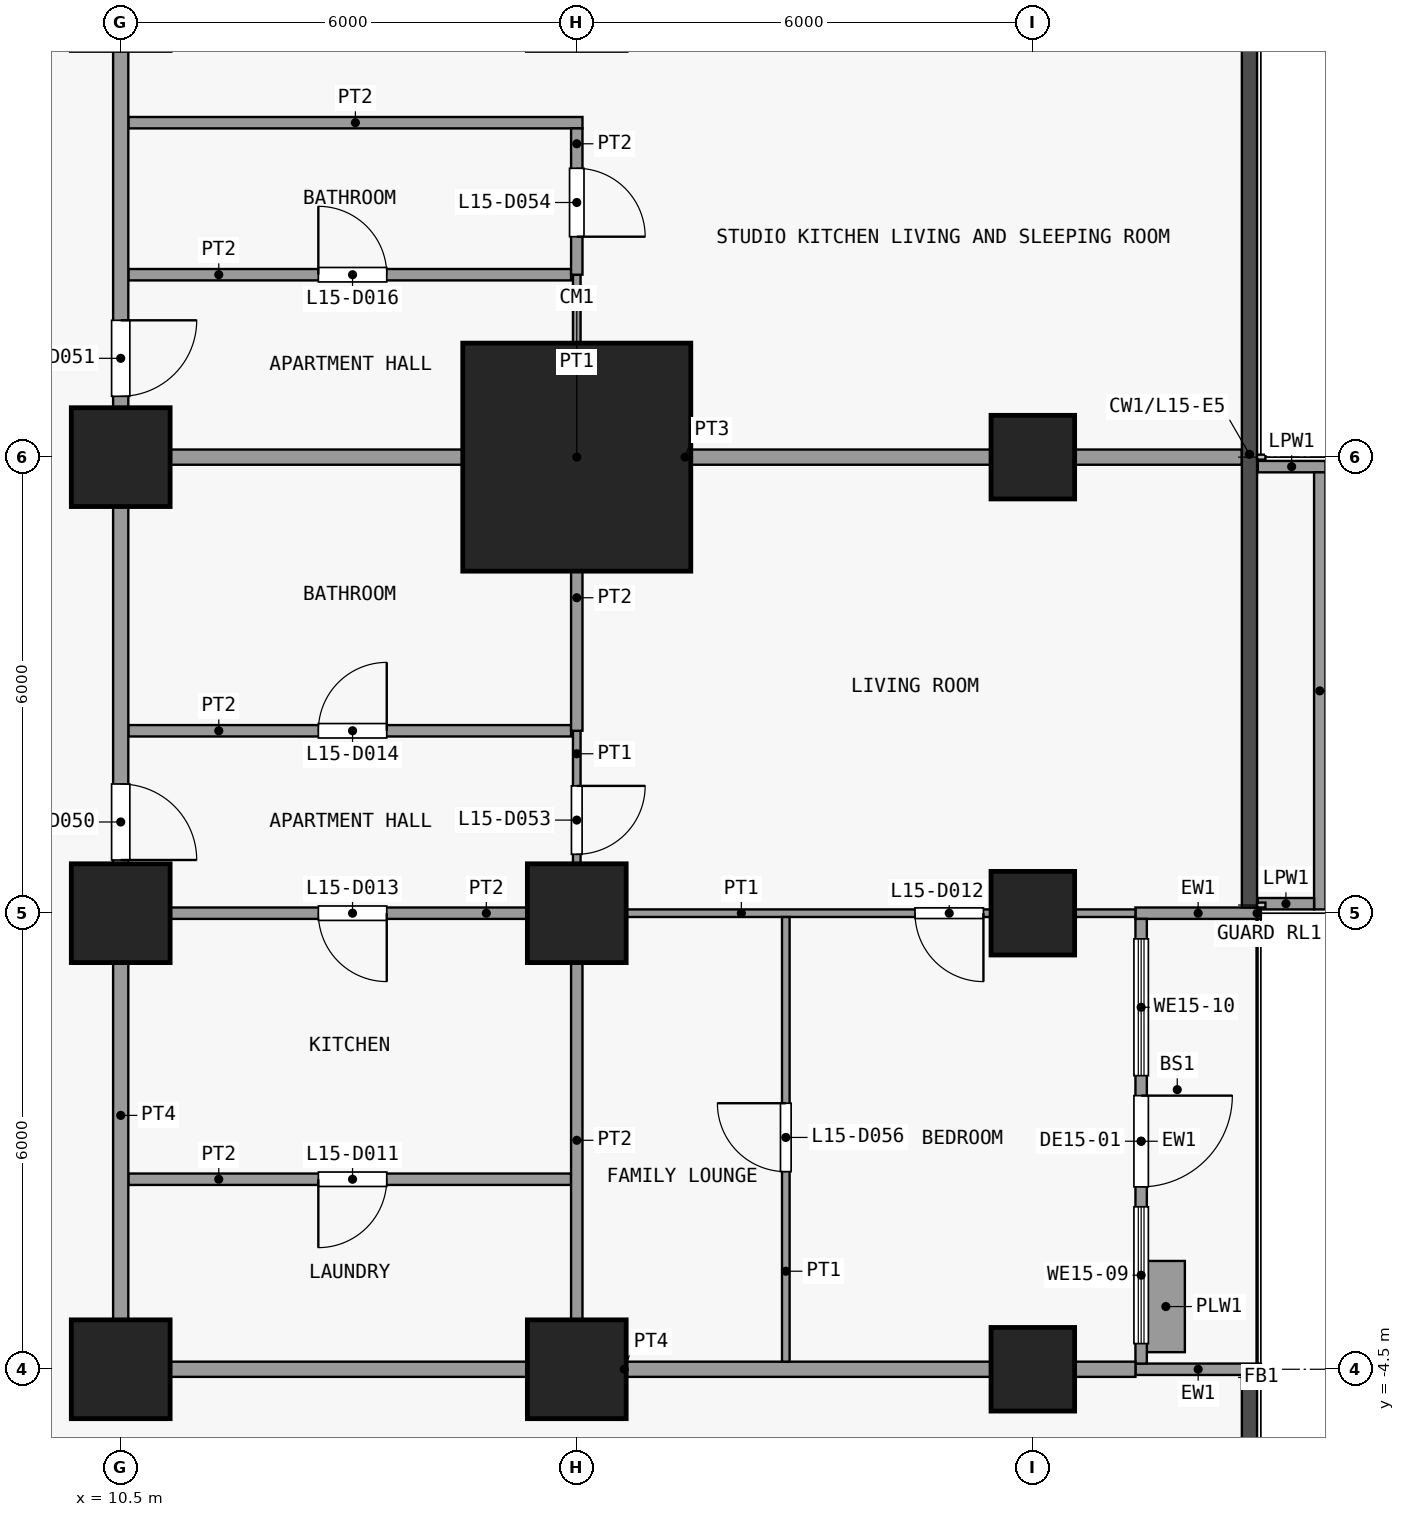
"""IFC4 building model, lengths in metres.
Left out: names, types, materials, properties, quantities, classifications, styles, units other than length and angle.
Written with IfcOpenShell. Run it as: python <this file> out.ifc"""

import sys

from ifc_helpers import new_model, si_unit, direction, frame, frame_2d, origin, origin_2d, place, context, subcontext, project, spatial, rectangle, extrude, element, fill, save


model = new_model("IFC4")
c1 = context("Model", 3, precision=1e-05, world=origin(), true_north=direction((0.0, 1.0)))
c2 = subcontext(c1, "Body", "Model", "MODEL_VIEW")
j1 = project(units=[si_unit("LENGTHUNIT", "METRE"), si_unit("PLANEANGLEUNIT", "RADIAN")], contexts=[c1])
p1 = place(None, origin())
s1 = spatial("IfcSite", under=j1, at=p1, CompositionType="ELEMENT")
p2 = place(p1, origin())
s2 = spatial("IfcBuilding", under=s1, at=p2, CompositionType="ELEMENT")
p3 = place(p2, frame((0.0, 0.0, 64.9)))
s3 = spatial("IfcBuildingStorey", under=s2, at=p3, CompositionType="ELEMENT", Elevation=64.9)
for number, where, z_axis, x_axis in (
    (1, (10.5, -4.5, 0.0), (0.0, 0.0, 1.0), (1.0, 0.0, 0.0)),
    (2, (10.5, 1.5, 0.0), (0.0, 0.0, 1.0), (1.0, 0.0, 0.0)),
    (3, (10.5, 7.5, 0.0), (0.0, 0.0, 1.0), (1.0, 0.0, 0.0)),
    (4, (16.5, -4.5, 0.0), (0.0, 0.0, 1.0), (1.0, 0.0, 0.0)),
    (5, (16.5, 1.5, 0.0), (0.0, 0.0, 1.0), (1.0, 0.0, 0.0)),
):
    element("IfcColumn", number, at=place(p3, frame(where, z_axis=z_axis, x_axis=x_axis)), inside=s3, PredefinedType="COLUMN", context=c2, shape_type="SweptSolid", body=[
        extrude(rectangle(XDim=1.3, YDim=1.3, at=origin_2d()), origin(), (0.0, 0.0, 1.0), 3.6),
    ])
p4 = place(p3, frame((16.5, 7.5, 0.0), z_axis=(0.0, 0.0, 1.0), x_axis=(1.0, 0.0, 0.0)))
e6 = element("IfcColumn", 6, at=p4, inside=s3, PredefinedType="COLUMN", context=c2, shape_type="SweptSolid", body=[
    extrude(rectangle(XDim=3.0, YDim=3.0, at=origin_2d()), origin(), (0.0, 0.0, 1.0), 3.6),
])
for number, where, z_axis, x_axis in (
    (7, (22.5, -4.5, 0.0), (0.0, 0.0, 1.0), (1.0, 0.0, 0.0)),
    (8, (22.5, 1.5, 0.0), (0.0, 0.0, 1.0), (1.0, 0.0, 0.0)),
    (9, (22.5, 7.5, 0.0), (0.0, 0.0, 1.0), (1.0, 0.0, 0.0)),
):
    element("IfcColumn", number, at=place(p3, frame(where, z_axis=z_axis, x_axis=x_axis)), inside=s3, PredefinedType="COLUMN", context=c2, shape_type="SweptSolid", body=[
        extrude(rectangle(XDim=1.1, YDim=1.1, at=origin_2d()), origin(), (0.0, 0.0, 1.0), 3.6),
    ])
for number, where, z_axis, x_axis in (
    (10, (23.85, -4.5, 0.0), (0.0, 0.0, 1.0), (1.0, 0.0, 0.0)),
    (11, (23.85, 1.5, 0.0), (0.0, 0.0, 1.0), (1.0, 0.0, 0.0)),
):
    element("IfcWall", number, at=place(p3, frame(where, z_axis=z_axis, x_axis=x_axis)), inside=s3, PredefinedType="SOLIDWALL", context=c2, shape_type="SweptSolid", body=[
        extrude(rectangle(XDim=1.65, YDim=0.15, at=frame_2d((0.825, 0.0))), origin(), (0.0, 0.0, 1.0), 3.3),
    ])
p5 = place(p3, frame((23.925, 1.425, 0.0), z_axis=(0.0, 0.0, 1.0), x_axis=(0.0, -1.0, 0.0)))
e12 = element("IfcWall", 12, at=p5, inside=s3, PredefinedType="SOLIDWALL", context=c2, shape_type="SweptSolid", body=[
    extrude(rectangle(XDim=5.85, YDim=0.15, at=frame_2d((2.925, 0.0))), origin(), (0.0, 0.0, 1.0), 3.3),
])
p6 = place(p5, frame((2.325, 0.0, 0.0)))
e13 = element("IfcOpeningElement", 13, at=p6, cuts=e12, PredefinedType="OPENING", context=c2, shape_type="SweptSolid", body=[
    extrude(rectangle(XDim=1.2, YDim=2.4, at=frame_2d((0.6, 1.2))), frame((0.0, 0.085, 0.0), z_axis=(0.0, -1.0, 0.0), x_axis=(1.0, 0.0, 0.0)), (0.0, 0.0, 1.0), 0.17),
])
p7 = place(p5, frame((3.788, 0.0, 0.9)))
e14 = element("IfcOpeningElement", 14, at=p7, cuts=e12, PredefinedType="OPENING", context=c2, shape_type="SweptSolid", body=[
    extrude(rectangle(XDim=1.8, YDim=2.1, at=frame_2d((0.9, 1.05))), frame((0.0, 0.085, 0.0), z_axis=(0.0, -1.0, 0.0), x_axis=(1.0, 0.0, 0.0)), (0.0, 0.0, 1.0), 0.17),
])
p8 = place(p5, frame((0.262, 0.0, 0.9)))
e15 = element("IfcOpeningElement", 15, at=p8, cuts=e12, PredefinedType="OPENING", context=c2, shape_type="SweptSolid", body=[
    extrude(rectangle(XDim=1.8, YDim=2.1, at=frame_2d((0.9, 1.05))), frame((0.0, 0.085, 0.0), z_axis=(0.0, -1.0, 0.0), x_axis=(1.0, 0.0, 0.0)), (0.0, 0.0, 1.0), 0.17),
])
p9 = place(p3, frame((24.25, -4.275, 0.0), z_axis=(0.0, 0.0, 1.0), x_axis=(0.0, 1.0, 0.0)))
e16 = element("IfcWall", 16, at=p9, inside=s3, PredefinedType="USERDEFINED", context=c2, shape_type="SweptSolid", body=[
    extrude(rectangle(XDim=1.2, YDim=0.5, at=frame_2d((0.6, 0.0))), origin(), (0.0, 0.0, 1.0), 0.9),
])
p10 = place(p3, frame((25.46, 7.375, 0.0), z_axis=(0.0, 0.0, 1.0), x_axis=(1.0, 0.0, 0.0)))
e17 = element("IfcWall", 17, at=p10, inside=s3, PredefinedType="PARAPET", context=c2, shape_type="SweptSolid", body=[
    extrude(rectangle(XDim=0.89, YDim=0.15, at=frame_2d((0.445, 0.0))), origin(), (0.0, 0.0, 1.0), 1.15),
])
p11 = place(p3, frame((26.275, 7.3, 0.0), z_axis=(0.0, 0.0, 1.0), x_axis=(0.0, -1.0, 0.0)))
e18 = element("IfcWall", 18, at=p11, inside=s3, PredefinedType="PARAPET", context=c2, shape_type="SweptSolid", body=[
    extrude(rectangle(XDim=5.75, YDim=0.15, at=frame_2d((2.875, 0.0))), origin(), (0.0, 0.0, 1.0), 1.15),
])
p12 = place(p3, frame((26.2, 1.625, 0.0), z_axis=(0.0, 0.0, 1.0), x_axis=(-1.0, 0.0, 0.0)))
e19 = element("IfcWall", 19, at=p12, inside=s3, PredefinedType="PARAPET", context=c2, shape_type="SweptSolid", body=[
    extrude(rectangle(XDim=0.74, YDim=0.15, at=frame_2d((0.37, 0.0))), origin(), (0.0, 0.0, 1.0), 1.15),
])
p13 = place(p3, frame((10.4, -4.5, 0.0), z_axis=(0.0, 0.0, 1.0), x_axis=(1.0, 0.0, 0.0)))
e20 = element("IfcWall", 20, at=p13, inside=s3, PredefinedType="PARTITIONING", context=c2, shape_type="SweptSolid", body=[
    extrude(rectangle(XDim=13.45, YDim=0.2, at=frame_2d((6.725, 0.0))), origin(), (0.0, 0.0, 1.0), 3.3),
])
p14 = place(p3, frame((10.6, -2.0, 0.0), z_axis=(0.0, 0.0, 1.0), x_axis=(1.0, 0.0, 0.0)))
e21 = element("IfcWall", 21, at=p14, inside=s3, PredefinedType="PARTITIONING", context=c2, shape_type="SweptSolid", body=[
    extrude(rectangle(XDim=5.825, YDim=0.15, at=frame_2d((2.913, 0.0))), origin(), (0.0, 0.0, 1.0), 3.3),
])
p15 = place(p14, frame((2.5, 0.0, 0.0)))
e22 = element("IfcOpeningElement", 22, at=p15, cuts=e21, PredefinedType="OPENING", context=c2, shape_type="SweptSolid", body=[
    extrude(rectangle(XDim=0.9, YDim=2.1, at=frame_2d((0.45, 1.05))), frame((0.0, 0.085, 0.0), z_axis=(0.0, -1.0, 0.0), x_axis=(1.0, 0.0, 0.0)), (0.0, 0.0, 1.0), 0.17),
])
p16 = place(p3, frame((16.5, 1.5, 0.0), z_axis=(0.0, 0.0, 1.0), x_axis=(1.0, 0.0, 0.0)))
e23 = element("IfcWall", 23, at=p16, inside=s3, PredefinedType="PARTITIONING", context=c2, shape_type="SweptSolid", body=[
    extrude(rectangle(XDim=7.35, YDim=0.1, at=frame_2d((3.675, 0.0))), origin(), (0.0, 0.0, 1.0), 3.3),
])
p17 = place(p16, frame((4.45, 0.0, 0.0)))
e24 = element("IfcOpeningElement", 24, at=p17, cuts=e23, PredefinedType="OPENING", context=c2, shape_type="SweptSolid", body=[
    extrude(rectangle(XDim=0.9, YDim=2.1, at=frame_2d((0.45, 1.05))), frame((0.0, 0.06, 0.0), z_axis=(0.0, -1.0, 0.0), x_axis=(1.0, 0.0, 0.0)), (0.0, 0.0, 1.0), 0.12),
])
p18 = place(p3, frame((10.6, 1.5, 0.0), z_axis=(0.0, 0.0, 1.0), x_axis=(1.0, 0.0, 0.0)))
e25 = element("IfcWall", 25, at=p18, inside=s3, PredefinedType="PARTITIONING", context=c2, shape_type="SweptSolid", body=[
    extrude(rectangle(XDim=5.9, YDim=0.15, at=frame_2d((2.95, 0.0))), origin(), (0.0, 0.0, 1.0), 3.3),
])
p19 = place(p18, frame((2.5, 0.0, 0.0)))
e26 = element("IfcOpeningElement", 26, at=p19, cuts=e25, PredefinedType="OPENING", context=c2, shape_type="SweptSolid", body=[
    extrude(rectangle(XDim=0.9, YDim=2.1, at=frame_2d((0.45, 1.05))), frame((0.0, 0.085, 0.0), z_axis=(0.0, -1.0, 0.0), x_axis=(1.0, 0.0, 0.0)), (0.0, 0.0, 1.0), 0.17),
])
p20 = place(p3, frame((10.6, 3.9, 0.0), z_axis=(0.0, 0.0, 1.0), x_axis=(1.0, 0.0, 0.0)))
e27 = element("IfcWall", 27, at=p20, inside=s3, PredefinedType="PARTITIONING", context=c2, shape_type="SweptSolid", body=[
    extrude(rectangle(XDim=5.825, YDim=0.15, at=frame_2d((2.913, 0.0))), origin(), (0.0, 0.0, 1.0), 3.3),
])
p21 = place(p20, frame((2.5, 0.0, 0.0)))
e28 = element("IfcOpeningElement", 28, at=p21, cuts=e27, PredefinedType="OPENING", context=c2, shape_type="SweptSolid", body=[
    extrude(rectangle(XDim=0.9, YDim=2.1, at=frame_2d((0.45, 1.05))), frame((0.0, 0.085, 0.0), z_axis=(0.0, -1.0, 0.0), x_axis=(1.0, 0.0, 0.0)), (0.0, 0.0, 1.0), 0.17),
])
p22 = place(p3, frame((10.6, 7.5, 0.0), z_axis=(0.0, 0.0, 1.0), x_axis=(1.0, 0.0, 0.0)))
e29 = element("IfcWall", 29, at=p22, inside=s3, PredefinedType="PARTITIONING", context=c2, shape_type="SweptSolid", body=[
    extrude(rectangle(XDim=14.65, YDim=0.2, at=frame_2d((7.325, 0.0))), origin(), (0.0, 0.0, 1.0), 3.3),
])
p23 = place(p3, frame((10.6, 9.9, 0.0), z_axis=(0.0, 0.0, 1.0), x_axis=(1.0, 0.0, 0.0)))
e30 = element("IfcWall", 30, at=p23, inside=s3, PredefinedType="PARTITIONING", context=c2, shape_type="SweptSolid", body=[
    extrude(rectangle(XDim=5.825, YDim=0.15, at=frame_2d((2.913, 0.0))), origin(), (0.0, 0.0, 1.0), 3.3),
])
p24 = place(p23, frame((2.5, 0.0, 0.0)))
e31 = element("IfcOpeningElement", 31, at=p24, cuts=e30, PredefinedType="OPENING", context=c2, shape_type="SweptSolid", body=[
    extrude(rectangle(XDim=0.9, YDim=2.1, at=frame_2d((0.45, 1.05))), frame((0.0, 0.085, 0.0), z_axis=(0.0, -1.0, 0.0), x_axis=(1.0, 0.0, 0.0)), (0.0, 0.0, 1.0), 0.17),
])
p25 = place(p3, frame((10.6, 11.9, 0.0), z_axis=(0.0, 0.0, 1.0), x_axis=(1.0, 0.0, 0.0)))
e32 = element("IfcWall", 32, at=p25, inside=s3, PredefinedType="PARTITIONING", context=c2, shape_type="SweptSolid", body=[
    extrude(rectangle(XDim=5.975, YDim=0.15, at=frame_2d((2.987, 0.0))), origin(), (0.0, 0.0, 1.0), 3.3),
])
p26 = place(p3, frame((10.5, -4.4, 0.0), z_axis=(0.0, 0.0, 1.0), x_axis=(0.0, 1.0, 0.0)))
e33 = element("IfcWall", 33, at=p26, inside=s3, PredefinedType="PARTITIONING", context=c2, shape_type="SweptSolid", body=[
    extrude(rectangle(XDim=17.8, YDim=0.2, at=frame_2d((8.9, 0.0))), origin(), (0.0, 0.0, 1.0), 3.3),
])
p27 = place(p26, frame((6.6, 0.0, 0.0)))
e34 = element("IfcOpeningElement", 34, at=p27, cuts=e33, PredefinedType="OPENING", context=c2, shape_type="SweptSolid", body=[
    extrude(rectangle(XDim=1.0, YDim=2.1, at=frame_2d((0.5, 1.05))), frame((0.0, 0.11, 0.0), z_axis=(0.0, -1.0, 0.0), x_axis=(1.0, 0.0, 0.0)), (0.0, 0.0, 1.0), 0.22),
])
p28 = place(p26, frame((12.7, 0.0, 0.0)))
e35 = element("IfcOpeningElement", 35, at=p28, cuts=e33, PredefinedType="OPENING", context=c2, shape_type="SweptSolid", body=[
    extrude(rectangle(XDim=1.0, YDim=2.1, at=frame_2d((0.5, 1.05))), frame((0.0, 0.11, 0.0), z_axis=(0.0, -1.0, 0.0), x_axis=(1.0, 0.0, 0.0)), (0.0, 0.0, 1.0), 0.22),
])
p29 = place(p3, frame((16.5, 1.575, 0.0), z_axis=(0.0, 0.0, 1.0), x_axis=(0.0, 1.0, 0.0)))
e36 = element("IfcWall", 36, at=p29, inside=s3, PredefinedType="PARTITIONING", context=c2, shape_type="SweptSolid", body=[
    extrude(rectangle(XDim=2.325, YDim=0.1, at=frame_2d((1.163, 0.0))), origin(), (0.0, 0.0, 1.0), 3.3),
])
p30 = place(p29, frame((0.7, 0.0, 0.0)))
e37 = element("IfcOpeningElement", 37, at=p30, cuts=e36, PredefinedType="OPENING", context=c2, shape_type="SweptSolid", body=[
    extrude(rectangle(XDim=0.9, YDim=2.1, at=frame_2d((0.45, 1.05))), frame((0.0, 0.06, 0.0), z_axis=(0.0, -1.0, 0.0), x_axis=(1.0, 0.0, 0.0)), (0.0, 0.0, 1.0), 0.12),
])
p31 = place(p3, frame((16.5, 7.6, 0.0), z_axis=(0.0, 0.0, 1.0), x_axis=(0.0, 1.0, 0.0)))
e38 = element("IfcWall", 38, at=p31, inside=s3, PredefinedType="PARTITIONING", context=c2, shape_type="SweptSolid", body=[
    extrude(rectangle(XDim=2.3, YDim=0.1, at=frame_2d((1.15, 0.0))), origin(), (0.0, 0.0, 1.0), 3.3),
])
p32 = place(p3, frame((16.5, -4.4, 0.0), z_axis=(0.0, 0.0, 1.0), x_axis=(0.0, 1.0, 0.0)))
e39 = element("IfcWall", 39, at=p32, inside=s3, PredefinedType="PARTITIONING", context=c2, shape_type="SweptSolid", body=[
    extrude(rectangle(XDim=5.825, YDim=0.15, at=frame_2d((2.913, 0.0))), origin(), (0.0, 0.0, 1.0), 3.3),
])
p33 = place(p3, frame((16.5, 3.9, 0.0), z_axis=(0.0, 0.0, 1.0), x_axis=(0.0, 1.0, 0.0)))
e40 = element("IfcWall", 40, at=p33, inside=s3, PredefinedType="PARTITIONING", context=c2, shape_type="SweptSolid", body=[
    extrude(rectangle(XDim=3.5, YDim=0.15, at=frame_2d((1.75, 0.0))), origin(), (0.0, 0.0, 1.0), 3.3),
])
p34 = place(p3, frame((16.5, 9.9, 0.0), z_axis=(0.0, 0.0, 1.0), x_axis=(0.0, 1.0, 0.0)))
e41 = element("IfcWall", 41, at=p34, inside=s3, PredefinedType="PARTITIONING", context=c2, shape_type="SweptSolid", body=[
    extrude(rectangle(XDim=1.925, YDim=0.15, at=frame_2d((0.962, 0.0))), origin(), (0.0, 0.0, 1.0), 3.3),
])
p35 = place(p34, frame((0.5, 0.0, 0.0)))
e42 = element("IfcOpeningElement", 42, at=p35, cuts=e41, PredefinedType="OPENING", context=c2, shape_type="SweptSolid", body=[
    extrude(rectangle(XDim=0.9, YDim=2.1, at=frame_2d((0.45, 1.05))), frame((0.0, 0.085, 0.0), z_axis=(0.0, -1.0, 0.0), x_axis=(1.0, 0.0, 0.0)), (0.0, 0.0, 1.0), 0.17),
])
p36 = place(p3, frame((19.25, -4.4, 0.0), z_axis=(0.0, 0.0, 1.0), x_axis=(0.0, 1.0, 0.0)))
e43 = element("IfcWall", 43, at=p36, inside=s3, PredefinedType="PARTITIONING", context=c2, shape_type="SweptSolid", body=[
    extrude(rectangle(XDim=5.85, YDim=0.1, at=frame_2d((2.925, 0.0))), origin(), (0.0, 0.0, 1.0), 3.3),
])
p37 = place(p36, frame((2.5, 0.0, 0.0)))
e44 = element("IfcOpeningElement", 44, at=p37, cuts=e43, PredefinedType="OPENING", context=c2, shape_type="SweptSolid", body=[
    extrude(rectangle(XDim=0.9, YDim=2.1, at=frame_2d((0.45, 1.05))), frame((0.0, 0.06, 0.0), z_axis=(0.0, -1.0, 0.0), x_axis=(1.0, 0.0, 0.0)), (0.0, 0.0, 1.0), 0.12),
])
p38 = place(p6, origin())
e45 = element("IfcDoor", 45, at=p38, inside=s3, OperationType="SINGLE_SWING_LEFT", PredefinedType="DOOR", context=c2, shape_type="SweptSolid", body=[
    extrude(rectangle(XDim=1.2, YDim=2.4, at=frame_2d((0.6, 1.2))), frame((0.0, 0.025, 0.0), z_axis=(0.0, -1.0, 0.0), x_axis=(1.0, 0.0, 0.0)), (0.0, 0.0, 1.0), 0.05),
])
fill(e13, e45)
p39 = place(p7, origin())
e46 = element("IfcWindow", 46, at=p39, inside=s3, PartitioningType="SINGLE_PANEL", PredefinedType="WINDOW", context=c2, shape_type="SweptSolid", body=[
    extrude(rectangle(XDim=1.8, YDim=2.1, at=frame_2d((0.9, 1.05))), frame((0.0, 0.03, 0.0), z_axis=(0.0, -1.0, 0.0), x_axis=(1.0, 0.0, 0.0)), (0.0, 0.0, 1.0), 0.06),
])
fill(e14, e46)
p40 = place(p8, origin())
e47 = element("IfcWindow", 47, at=p40, inside=s3, PartitioningType="SINGLE_PANEL", PredefinedType="WINDOW", context=c2, shape_type="SweptSolid", body=[
    extrude(rectangle(XDim=1.8, YDim=2.1, at=frame_2d((0.9, 1.05))), frame((0.0, 0.03, 0.0), z_axis=(0.0, -1.0, 0.0), x_axis=(1.0, 0.0, 0.0)), (0.0, 0.0, 1.0), 0.06),
])
fill(e15, e47)
p41 = place(p15, origin())
e48 = element("IfcDoor", 48, at=p41, inside=s3, OperationType="SINGLE_SWING_LEFT", PredefinedType="DOOR", context=c2, shape_type="SweptSolid", body=[
    extrude(rectangle(XDim=0.9, YDim=2.1, at=frame_2d((0.45, 1.05))), frame((0.0, 0.025, 0.0), z_axis=(0.0, -1.0, 0.0), x_axis=(1.0, 0.0, 0.0)), (0.0, 0.0, 1.0), 0.05),
])
fill(e22, e48)
p42 = place(p17, origin())
e49 = element("IfcDoor", 49, at=p42, inside=s3, OperationType="SINGLE_SWING_RIGHT", PredefinedType="DOOR", context=c2, shape_type="SweptSolid", body=[
    extrude(rectangle(XDim=0.9, YDim=2.1, at=frame_2d((0.45, 1.05))), frame((0.0, 0.025, 0.0), z_axis=(0.0, -1.0, 0.0), x_axis=(1.0, 0.0, 0.0)), (0.0, 0.0, 1.0), 0.05),
])
fill(e24, e49)
p43 = place(p19, origin())
e50 = element("IfcDoor", 50, at=p43, inside=s3, OperationType="SINGLE_SWING_RIGHT", PredefinedType="DOOR", context=c2, shape_type="SweptSolid", body=[
    extrude(rectangle(XDim=0.9, YDim=2.1, at=frame_2d((0.45, 1.05))), frame((0.0, 0.025, 0.0), z_axis=(0.0, -1.0, 0.0), x_axis=(1.0, 0.0, 0.0)), (0.0, 0.0, 1.0), 0.05),
])
fill(e26, e50)
p44 = place(p21, origin())
e51 = element("IfcDoor", 51, at=p44, inside=s3, OperationType="SINGLE_SWING_LEFT", PredefinedType="DOOR", context=c2, shape_type="SweptSolid", body=[
    extrude(rectangle(XDim=0.9, YDim=2.1, at=frame_2d((0.45, 1.05))), frame((0.0, 0.025, 0.0), z_axis=(0.0, -1.0, 0.0), x_axis=(1.0, 0.0, 0.0)), (0.0, 0.0, 1.0), 0.05),
])
fill(e28, e51)
p45 = place(p24, origin())
e52 = element("IfcDoor", 52, at=p45, inside=s3, OperationType="SINGLE_SWING_RIGHT", PredefinedType="DOOR", context=c2, shape_type="SweptSolid", body=[
    extrude(rectangle(XDim=0.9, YDim=2.1, at=frame_2d((0.45, 1.05))), frame((0.0, 0.025, 0.0), z_axis=(0.0, -1.0, 0.0), x_axis=(1.0, 0.0, 0.0)), (0.0, 0.0, 1.0), 0.05),
])
fill(e31, e52)
p46 = place(p27, origin())
e53 = element("IfcDoor", 53, at=p46, inside=s3, OperationType="SINGLE_SWING_LEFT", PredefinedType="DOOR", context=c2, shape_type="SweptSolid", body=[
    extrude(rectangle(XDim=1.0, YDim=2.1, at=frame_2d((0.5, 1.05))), frame((0.0, 0.025, 0.0), z_axis=(0.0, -1.0, 0.0), x_axis=(1.0, 0.0, 0.0)), (0.0, 0.0, 1.0), 0.05),
])
fill(e34, e53)
p47 = place(p28, origin())
e54 = element("IfcDoor", 54, at=p47, inside=s3, OperationType="SINGLE_SWING_RIGHT", PredefinedType="DOOR", context=c2, shape_type="SweptSolid", body=[
    extrude(rectangle(XDim=1.0, YDim=2.1, at=frame_2d((0.5, 1.05))), frame((0.0, 0.025, 0.0), z_axis=(0.0, -1.0, 0.0), x_axis=(1.0, 0.0, 0.0)), (0.0, 0.0, 1.0), 0.05),
])
fill(e35, e54)
p48 = place(p30, origin())
e55 = element("IfcDoor", 55, at=p48, inside=s3, OperationType="SINGLE_SWING_RIGHT", PredefinedType="DOOR", context=c2, shape_type="SweptSolid", body=[
    extrude(rectangle(XDim=0.9, YDim=2.1, at=frame_2d((0.45, 1.05))), frame((0.0, 0.025, 0.0), z_axis=(0.0, -1.0, 0.0), x_axis=(1.0, 0.0, 0.0)), (0.0, 0.0, 1.0), 0.05),
])
fill(e37, e55)
p49 = place(p35, origin())
e56 = element("IfcDoor", 56, at=p49, inside=s3, OperationType="SINGLE_SWING_LEFT", PredefinedType="DOOR", context=c2, shape_type="SweptSolid", body=[
    extrude(rectangle(XDim=0.9, YDim=2.1, at=frame_2d((0.45, 1.05))), frame((0.0, 0.025, 0.0), z_axis=(0.0, -1.0, 0.0), x_axis=(1.0, 0.0, 0.0)), (0.0, 0.0, 1.0), 0.05),
])
fill(e42, e56)
p50 = place(p37, origin())
e57 = element("IfcDoor", 57, at=p50, inside=s3, OperationType="SINGLE_SWING_LEFT", PredefinedType="DOOR", context=c2, shape_type="SweptSolid", body=[
    extrude(rectangle(XDim=0.9, YDim=2.1, at=frame_2d((0.45, 1.05))), frame((0.0, 0.025, 0.0), z_axis=(0.0, -1.0, 0.0), x_axis=(1.0, 0.0, 0.0)), (0.0, 0.0, 1.0), 0.05),
])
fill(e44, e57)
save(model, sys.argv[1])
